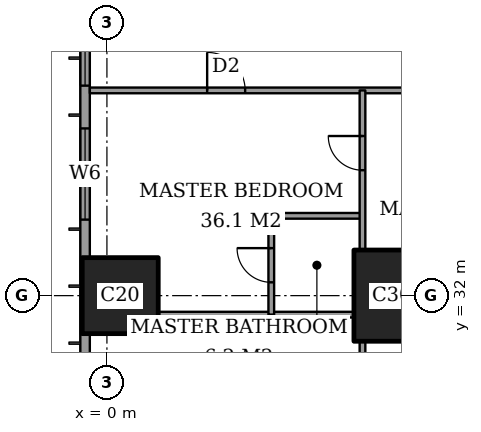
"""IFC4 building model, lengths in metres.
Left out: names, types, materials, properties, quantities, classifications, styles, units other than length and angle.
Written with IfcOpenShell. Run it as: python <this file> out.ifc"""

import sys

from ifc_helpers import new_model, si_unit, direction, frame, frame_2d, origin, origin_2d, place, context, subcontext, project, spatial, rectangle, extrude, element, fill, save


model = new_model("IFC4")
c1 = context("Model", 3, precision=1e-05, world=origin(), true_north=direction((0.0, 1.0)))
c2 = subcontext(c1, "Body", "Model", "MODEL_VIEW")
j1 = project(units=[si_unit("LENGTHUNIT", "METRE"), si_unit("PLANEANGLEUNIT", "RADIAN")], contexts=[c1])
p1 = place(None, origin())
s1 = spatial("IfcSite", under=j1, at=p1, CompositionType="ELEMENT")
p2 = place(p1, origin())
s2 = spatial("IfcBuilding", under=s1, at=p2, CompositionType="ELEMENT")
p3 = place(p2, frame((0.0, 0.0, 69.2)))
s3 = spatial("IfcBuildingStorey", under=s2, at=p3, CompositionType="ELEMENT", Elevation=69.2)
p4 = place(p3, frame((0.35, 32.0, 0.0), z_axis=(0.0, 0.0, 1.0), x_axis=(1.0, 0.0, 0.0)))
e1 = element("IfcColumn", 1, at=p4, inside=s3, PredefinedType="COLUMN", context=c2, shape_type="SweptSolid", body=[
    extrude(rectangle(XDim=2.0, YDim=2.0, at=origin_2d()), origin(), (0.0, 0.0, 1.0), 3.6),
])
p5 = place(p3, frame((8.0, 32.0, 0.0), z_axis=(0.0, 0.0, 1.0), x_axis=(1.0, 0.0, 0.0)))
e2 = element("IfcColumn", 2, at=p5, inside=s3, PredefinedType="COLUMN", context=c2, shape_type="SweptSolid", body=[
    extrude(rectangle(XDim=3.0, YDim=2.4, at=origin_2d()), origin(), (0.0, 0.0, 1.0), 3.6),
])
p6 = place(p3, frame((-0.575, 44.825, 0.0), z_axis=(0.0, 0.0, 1.0), x_axis=(0.0, -1.0, 0.0)))
e3 = element("IfcWall", 3, at=p6, inside=s3, PredefinedType="SOLIDWALL", context=c2, shape_type="SweptSolid", body=[
    extrude(rectangle(XDim=41.65, YDim=0.25, at=frame_2d((20.825, 0.0))), origin(), (0.0, 0.0, 1.0), 3.6),
])
p7 = place(p6, frame((0.775, 0.0, 0.6)))
e4 = element("IfcOpeningElement", 4, at=p7, cuts=e3, PredefinedType="OPENING", context=c2, shape_type="SweptSolid", body=[
    extrude(rectangle(XDim=2.4, YDim=2.0, at=frame_2d((1.2, 1.0))), frame((0.0, 0.135, 0.0), z_axis=(0.0, -1.0, 0.0), x_axis=(1.0, 0.0, 0.0)), (0.0, 0.0, 1.0), 0.27),
])
p8 = place(p6, frame((6.1, 0.0, 0.6)))
e5 = element("IfcOpeningElement", 5, at=p8, cuts=e3, PredefinedType="OPENING", context=c2, shape_type="SweptSolid", body=[
    extrude(rectangle(XDim=1.2, YDim=2.0, at=frame_2d((0.6, 1.0))), frame((0.0, 0.135, 0.0), z_axis=(0.0, -1.0, 0.0), x_axis=(1.0, 0.0, 0.0)), (0.0, 0.0, 1.0), 0.27),
])
p9 = place(p6, frame((8.425, 0.0, 0.6)))
e6 = element("IfcOpeningElement", 6, at=p9, cuts=e3, PredefinedType="OPENING", context=c2, shape_type="SweptSolid", body=[
    extrude(rectangle(XDim=2.4, YDim=2.0, at=frame_2d((1.2, 1.0))), frame((0.0, 0.135, 0.0), z_axis=(0.0, -1.0, 0.0), x_axis=(1.0, 0.0, 0.0)), (0.0, 0.0, 1.0), 0.27),
])
p10 = place(p6, frame((15.625, 0.0, 0.6)))
e7 = element("IfcOpeningElement", 7, at=p10, cuts=e3, PredefinedType="OPENING", context=c2, shape_type="SweptSolid", body=[
    extrude(rectangle(XDim=2.4, YDim=2.0, at=frame_2d((1.2, 1.0))), frame((0.0, 0.135, 0.0), z_axis=(0.0, -1.0, 0.0), x_axis=(1.0, 0.0, 0.0)), (0.0, 0.0, 1.0), 0.27),
])
p11 = place(p6, frame((23.625, 0.0, 0.6)))
e8 = element("IfcOpeningElement", 8, at=p11, cuts=e3, PredefinedType="OPENING", context=c2, shape_type="SweptSolid", body=[
    extrude(rectangle(XDim=2.4, YDim=2.0, at=frame_2d((1.2, 1.0))), frame((0.0, 0.135, 0.0), z_axis=(0.0, -1.0, 0.0), x_axis=(1.0, 0.0, 0.0)), (0.0, 0.0, 1.0), 0.27),
])
p12 = place(p6, frame((30.625, 0.0, 0.6)))
e9 = element("IfcOpeningElement", 9, at=p12, cuts=e3, PredefinedType="OPENING", context=c2, shape_type="SweptSolid", body=[
    extrude(rectangle(XDim=2.4, YDim=2.0, at=frame_2d((1.2, 1.0))), frame((0.0, 0.135, 0.0), z_axis=(0.0, -1.0, 0.0), x_axis=(1.0, 0.0, 0.0)), (0.0, 0.0, 1.0), 0.27),
])
p13 = place(p6, frame((34.225, 0.0, 0.6)))
e10 = element("IfcOpeningElement", 10, at=p13, cuts=e3, PredefinedType="OPENING", context=c2, shape_type="SweptSolid", body=[
    extrude(rectangle(XDim=1.2, YDim=2.0, at=frame_2d((0.6, 1.0))), frame((0.0, 0.135, 0.0), z_axis=(0.0, -1.0, 0.0), x_axis=(1.0, 0.0, 0.0)), (0.0, 0.0, 1.0), 0.27),
])
p14 = place(p6, frame((38.475, 0.0, 0.6)))
e11 = element("IfcOpeningElement", 11, at=p14, cuts=e3, PredefinedType="OPENING", context=c2, shape_type="SweptSolid", body=[
    extrude(rectangle(XDim=2.4, YDim=2.0, at=frame_2d((1.2, 1.0))), frame((0.0, 0.135, 0.0), z_axis=(0.0, -1.0, 0.0), x_axis=(1.0, 0.0, 0.0)), (0.0, 0.0, 1.0), 0.27),
])
p15 = place(p3, frame((1.35, 31.5, 0.0), z_axis=(0.0, 0.0, 1.0), x_axis=(1.0, 0.0, 0.0)))
e12 = element("IfcWall", 12, at=p15, inside=s3, PredefinedType="PARTITIONING", context=c2, shape_type="SweptSolid", body=[
    extrude(rectangle(XDim=5.15, YDim=0.15, at=frame_2d((2.575, 0.0))), origin(), (0.0, 0.0, 1.0), 3.35),
])
p16 = place(p3, frame((4.325, 34.1, 0.0), z_axis=(0.0, 0.0, 1.0), x_axis=(1.0, 0.0, 0.0)))
e13 = element("IfcWall", 13, at=p16, inside=s3, PredefinedType="PARTITIONING", context=c2, shape_type="SweptSolid", body=[
    extrude(rectangle(XDim=2.4, YDim=0.15, at=frame_2d((1.2, 0.0))), origin(), (0.0, 0.0, 1.0), 3.35),
])
p17 = place(p3, frame((-0.45, 37.4, 0.0), z_axis=(0.0, 0.0, 1.0), x_axis=(1.0, 0.0, 0.0)))
e14 = element("IfcWall", 14, at=p17, inside=s3, PredefinedType="PARTITIONING", context=c2, shape_type="SweptSolid", body=[
    extrude(rectangle(XDim=25.011, YDim=0.15, at=frame_2d((12.505, 0.0))), origin(), (0.0, 0.0, 1.0), 3.35),
])
p18 = place(p17, frame((10.65, 0.0, 0.0)))
e15 = element("IfcOpeningElement", 15, at=p18, cuts=e14, PredefinedType="OPENING", context=c2, shape_type="SweptSolid", body=[
    extrude(rectangle(XDim=1.0, YDim=2.1, at=frame_2d((0.5, 1.05))), frame((0.0, 0.085, 0.0), z_axis=(0.0, -1.0, 0.0), x_axis=(1.0, 0.0, 0.0)), (0.0, 0.0, 1.0), 0.17),
])
p19 = place(p17, frame((3.087, 0.0, 0.0)))
e16 = element("IfcOpeningElement", 16, at=p19, cuts=e14, PredefinedType="OPENING", context=c2, shape_type="SweptSolid", body=[
    extrude(rectangle(XDim=1.0, YDim=2.1, at=frame_2d((0.5, 1.05))), frame((0.0, 0.085, 0.0), z_axis=(0.0, -1.0, 0.0), x_axis=(1.0, 0.0, 0.0)), (0.0, 0.0, 1.0), 0.17),
])
p20 = place(p17, frame((13.45, 0.0, 0.0)))
e17 = element("IfcOpeningElement", 17, at=p20, cuts=e14, PredefinedType="OPENING", context=c2, shape_type="SweptSolid", body=[
    extrude(rectangle(XDim=1.0, YDim=2.1, at=frame_2d((0.5, 1.05))), frame((0.0, 0.085, 0.0), z_axis=(0.0, -1.0, 0.0), x_axis=(1.0, 0.0, 0.0)), (0.0, 0.0, 1.0), 0.17),
])
p21 = place(p17, frame((16.55, 0.0, 0.0)))
e18 = element("IfcOpeningElement", 18, at=p21, cuts=e14, PredefinedType="OPENING", context=c2, shape_type="SweptSolid", body=[
    extrude(rectangle(XDim=1.0, YDim=2.1, at=frame_2d((0.5, 1.05))), frame((0.0, 0.085, 0.0), z_axis=(0.0, -1.0, 0.0), x_axis=(1.0, 0.0, 0.0)), (0.0, 0.0, 1.0), 0.17),
])
p22 = place(p17, frame((21.175, 0.0, 0.0)))
e19 = element("IfcOpeningElement", 19, at=p22, cuts=e14, PredefinedType="OPENING", context=c2, shape_type="SweptSolid", body=[
    extrude(rectangle(XDim=1.0, YDim=2.1, at=frame_2d((0.5, 1.05))), frame((0.0, 0.085, 0.0), z_axis=(0.0, -1.0, 0.0), x_axis=(1.0, 0.0, 0.0)), (0.0, 0.0, 1.0), 0.17),
])
p23 = place(p3, frame((4.325, 31.5, 0.0), z_axis=(0.0, 0.0, 1.0), x_axis=(0.0, 1.0, 0.0)))
e20 = element("IfcWall", 20, at=p23, inside=s3, PredefinedType="PARTITIONING", context=c2, shape_type="SweptSolid", body=[
    extrude(rectangle(XDim=2.6, YDim=0.15, at=frame_2d((1.3, 0.0))), origin(), (0.0, 0.0, 1.0), 3.35),
])
p24 = place(p23, frame((0.85, 0.0, 0.0)))
e21 = element("IfcOpeningElement", 21, at=p24, cuts=e20, PredefinedType="OPENING", context=c2, shape_type="SweptSolid", body=[
    extrude(rectangle(XDim=0.9, YDim=2.1, at=frame_2d((0.45, 1.05))), frame((0.0, 0.085, 0.0), z_axis=(0.0, -1.0, 0.0), x_axis=(1.0, 0.0, 0.0)), (0.0, 0.0, 1.0), 0.17),
])
p25 = place(p3, frame((6.725, 28.35, 0.0), z_axis=(0.0, 0.0, 1.0), x_axis=(0.0, 1.0, 0.0)))
e22 = element("IfcWall", 22, at=p25, inside=s3, PredefinedType="PARTITIONING", context=c2, shape_type="SweptSolid", body=[
    extrude(rectangle(XDim=2.45, YDim=0.15, at=frame_2d((1.225, 0.0))), origin(), (0.0, 0.0, 1.0), 3.35),
])
p26 = place(p25, frame((0.913, 0.0, 0.0)))
e23 = element("IfcOpeningElement", 23, at=p26, cuts=e22, PredefinedType="OPENING", context=c2, shape_type="SweptSolid", body=[
    extrude(rectangle(XDim=1.0, YDim=2.1, at=frame_2d((0.5, 1.05))), frame((0.0, 0.085, 0.0), z_axis=(0.0, -1.0, 0.0), x_axis=(1.0, 0.0, 0.0)), (0.0, 0.0, 1.0), 0.17),
])
p27 = place(p3, frame((6.725, 33.2, 0.0), z_axis=(0.0, 0.0, 1.0), x_axis=(0.0, 1.0, 0.0)))
e24 = element("IfcWall", 24, at=p27, inside=s3, PredefinedType="PARTITIONING", context=c2, shape_type="SweptSolid", body=[
    extrude(rectangle(XDim=4.2, YDim=0.15, at=frame_2d((2.1, 0.0))), origin(), (0.0, 0.0, 1.0), 3.35),
])
p28 = place(p27, frame((2.1, 0.0, 0.0)))
e25 = element("IfcOpeningElement", 25, at=p28, cuts=e24, PredefinedType="OPENING", context=c2, shape_type="SweptSolid", body=[
    extrude(rectangle(XDim=0.9, YDim=2.1, at=frame_2d((0.45, 1.05))), frame((0.0, 0.085, 0.0), z_axis=(0.0, -1.0, 0.0), x_axis=(1.0, 0.0, 0.0)), (0.0, 0.0, 1.0), 0.17),
])
p29 = place(p8, origin())
e26 = element("IfcWindow", 26, at=p29, inside=s3, PartitioningType="SINGLE_PANEL", PredefinedType="WINDOW", context=c2, shape_type="SweptSolid", body=[
    extrude(rectangle(XDim=1.2, YDim=2.0, at=frame_2d((0.6, 1.0))), frame((0.0, 0.03, 0.0), z_axis=(0.0, -1.0, 0.0), x_axis=(1.0, 0.0, 0.0)), (0.0, 0.0, 1.0), 0.06),
])
fill(e5, e26)
p30 = place(p9, origin())
e27 = element("IfcWindow", 27, at=p30, inside=s3, PartitioningType="SINGLE_PANEL", PredefinedType="WINDOW", context=c2, shape_type="SweptSolid", body=[
    extrude(rectangle(XDim=2.4, YDim=2.0, at=frame_2d((1.2, 1.0))), frame((0.0, 0.03, 0.0), z_axis=(0.0, -1.0, 0.0), x_axis=(1.0, 0.0, 0.0)), (0.0, 0.0, 1.0), 0.06),
])
fill(e6, e27)
p31 = place(p24, origin())
e28 = element("IfcDoor", 28, at=p31, inside=s3, OperationType="SINGLE_SWING_LEFT", PredefinedType="DOOR", context=c2, shape_type="SweptSolid", body=[
    extrude(rectangle(XDim=0.9, YDim=2.1, at=frame_2d((0.45, 1.05))), frame((0.0, 0.025, 0.0), z_axis=(0.0, -1.0, 0.0), x_axis=(1.0, 0.0, 0.0)), (0.0, 0.0, 1.0), 0.05),
])
fill(e21, e28)
p32 = place(p19, origin())
e29 = element("IfcDoor", 29, at=p32, inside=s3, OperationType="SINGLE_SWING_RIGHT", PredefinedType="DOOR", context=c2, shape_type="SweptSolid", body=[
    extrude(rectangle(XDim=1.0, YDim=2.1, at=frame_2d((0.5, 1.05))), frame((0.0, 0.025, 0.0), z_axis=(0.0, -1.0, 0.0), x_axis=(1.0, 0.0, 0.0)), (0.0, 0.0, 1.0), 0.05),
])
fill(e16, e29)
p33 = place(p28, origin())
e30 = element("IfcDoor", 30, at=p33, inside=s3, OperationType="SINGLE_SWING_LEFT", PredefinedType="DOOR", context=c2, shape_type="SweptSolid", body=[
    extrude(rectangle(XDim=0.9, YDim=2.1, at=frame_2d((0.45, 1.05))), frame((0.0, 0.025, 0.0), z_axis=(0.0, -1.0, 0.0), x_axis=(1.0, 0.0, 0.0)), (0.0, 0.0, 1.0), 0.05),
])
fill(e25, e30)
save(model, sys.argv[1])
